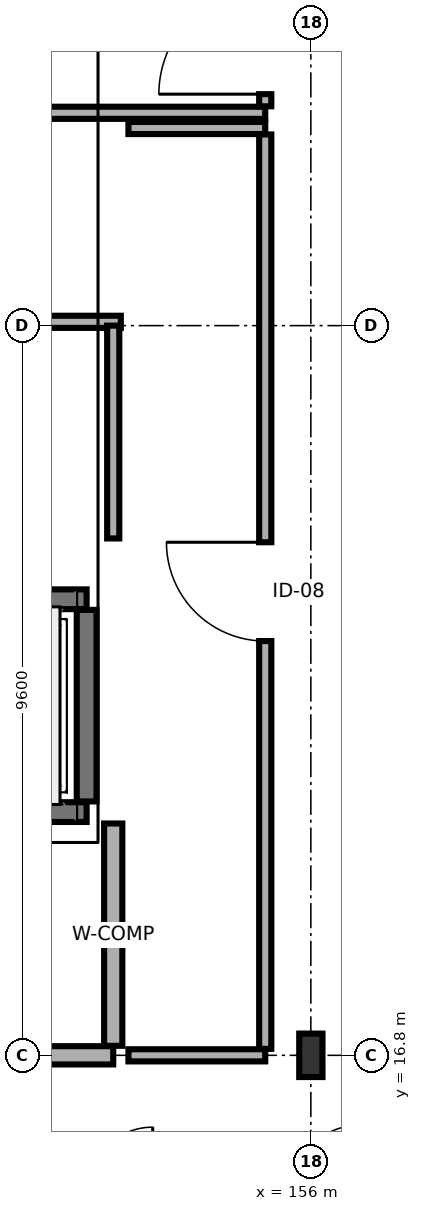
"""IFC4 building model, lengths in metres.
Left out: names, types, materials, properties, quantities, classifications, styles, units other than length and angle.
Written with IfcOpenShell. Run it as: python <this file> out.ifc"""

import sys

from ifc_helpers import new_model, si_unit, direction, frame, frame_2d, origin, origin_2d, place, context, subcontext, project, spatial, rectangle, i_section, extrude, element, fill, save


model = new_model("IFC4")
c1 = context("Model", 3, precision=1e-05, world=origin(), true_north=direction((0.0, 1.0)))
c2 = subcontext(c1, "Body", "Model", "MODEL_VIEW")
j1 = project(units=[si_unit("LENGTHUNIT", "METRE"), si_unit("PLANEANGLEUNIT", "RADIAN")], contexts=[c1])
p1 = place(None, origin())
s1 = spatial("IfcSite", under=j1, at=p1, CompositionType="ELEMENT")
p2 = place(p1, origin())
s2 = spatial("IfcBuilding", under=s1, at=p2, CompositionType="ELEMENT")
p3 = place(p2, frame((0.0, 0.0, 24.9)))
s3 = spatial("IfcBuildingStorey", under=s2, at=p3, CompositionType="ELEMENT", Elevation=24.9)
p4 = place(p3, frame((156.0, 16.8, 0.0), z_axis=(0.0, 0.0, 1.0), x_axis=(1.0, 0.0, 0.0)))
e1 = element("IfcColumn", 1, at=p4, inside=s3, PredefinedType="COLUMN", context=c2, shape_type="SweptSolid", body=[
    extrude(i_section(OverallWidth=0.306, OverallDepth=0.572, WebThickness=0.021, FlangeThickness=0.04, FilletRadius=0.027, at=origin_2d()), origin(), (0.0, 0.0, 1.0), 3.4),
])
p5 = place(p3, frame((150.55, 20.0, 0.0), z_axis=(0.0, 0.0, 1.0), x_axis=(1.0, 0.0, 0.0)))
e2 = element("IfcWall", 2, at=p5, inside=s3, PredefinedType="SHEAR", context=c2, shape_type="SweptSolid", body=[
    extrude(rectangle(XDim=2.5, YDim=0.26, at=frame_2d((1.25, 0.0))), origin(), (0.0, 0.0, 1.0), 3.19),
])
p6 = place(p5, frame((0.55, 0.0, 0.0)))
e3 = element("IfcOpeningElement", 3, at=p6, cuts=e2, PredefinedType="OPENING", context=c2, shape_type="SweptSolid", body=[
    extrude(rectangle(XDim=1.4, YDim=2.3, at=frame_2d((0.7, 1.15))), frame((0.0, 0.14, 0.0), z_axis=(0.0, -1.0, 0.0), x_axis=(1.0, 0.0, 0.0)), (0.0, 0.0, 1.0), 0.28),
])
p7 = place(p3, frame((150.55, 22.8, 0.0), z_axis=(0.0, 0.0, 1.0), x_axis=(1.0, 0.0, 0.0)))
e4 = element("IfcWall", 4, at=p7, inside=s3, PredefinedType="SHEAR", context=c2, shape_type="SweptSolid", body=[
    extrude(rectangle(XDim=2.5, YDim=0.26, at=frame_2d((1.25, 0.0))), origin(), (0.0, 0.0, 1.0), 3.19),
])
p8 = place(p3, frame((153.05, 20.14, 0.0), z_axis=(0.0, 0.0, 1.0), x_axis=(0.0, 1.0, 0.0)))
e5 = element("IfcWall", 5, at=p8, inside=s3, PredefinedType="SHEAR", context=c2, shape_type="SweptSolid", body=[
    extrude(rectangle(XDim=2.52, YDim=0.26, at=frame_2d((1.26, 0.0))), origin(), (0.0, 0.0, 1.0), 3.19),
])
p9 = place(p3, frame((146.4, 16.8, 0.0), z_axis=(0.0, 0.0, 1.0), x_axis=(1.0, 0.0, 0.0)))
e6 = element("IfcWall", 6, at=p9, inside=s3, PredefinedType="SOLIDWALL", context=c2, shape_type="SweptSolid", body=[
    extrude(rectangle(XDim=7.0, YDim=0.24, at=frame_2d((3.5, 0.0))), origin(), (0.0, 0.0, 1.0), 2.725),
])
p10 = place(p9, frame((2.7, 0.0, 0.0)))
e7 = element("IfcOpeningElement", 7, at=p10, cuts=e6, PredefinedType="OPENING", context=c2, shape_type="SweptSolid", body=[
    extrude(rectangle(XDim=1.6, YDim=2.2, at=frame_2d((0.8, 1.1))), frame((0.0, 0.13, 0.0), z_axis=(0.0, -1.0, 0.0), x_axis=(1.0, 0.0, 0.0)), (0.0, 0.0, 1.0), 0.26),
])
p11 = place(p3, frame((153.4, 16.925, 0.0), z_axis=(0.0, 0.0, 1.0), x_axis=(0.0, 1.0, 0.0)))
e8 = element("IfcWall", 8, at=p11, inside=s3, PredefinedType="SOLIDWALL", context=c2, shape_type="SweptSolid", body=[
    extrude(rectangle(XDim=2.925, YDim=0.24, at=frame_2d((1.462, 0.0))), origin(), (0.0, 0.0, 1.0), 2.725),
])
p12 = place(p3, frame((146.4, 29.2, 0.0), z_axis=(0.0, 0.0, 1.0), x_axis=(1.0, 0.0, 0.0)))
e9 = element("IfcWall", 9, at=p12, inside=s3, PredefinedType="PARTITIONING", context=c2, shape_type="SweptSolid", body=[
    extrude(rectangle(XDim=9.0, YDim=0.16, at=frame_2d((4.5, 0.0))), origin(), (0.0, 0.0, 1.0), 3.19),
])
p13 = place(p3, frame((155.4, 29.285, 0.0), z_axis=(0.0, 0.0, 1.0), x_axis=(0.0, 1.0, 0.0)))
e10 = element("IfcWall", 10, at=p13, inside=s3, PredefinedType="PARTITIONING", context=c2, shape_type="SweptSolid", body=[
    extrude(rectangle(XDim=9.03, YDim=0.16, at=frame_2d((4.515, 0.0))), origin(), (0.0, 0.0, 1.0), 3.19),
])
p14 = place(p13, frame((0.16, 0.0, 0.0)))
e11 = element("IfcOpeningElement", 11, at=p14, cuts=e10, PredefinedType="OPENING", context=c2, shape_type="SweptSolid", body=[
    extrude(rectangle(XDim=1.4, YDim=2.2, at=frame_2d((0.7, 1.1))), frame((0.0, 0.09, 0.0), z_axis=(0.0, -1.0, 0.0), x_axis=(1.0, 0.0, 0.0)), (0.0, 0.0, 1.0), 0.18),
])
p15 = place(p3, frame((153.6, 16.8, 0.0), z_axis=(0.0, 0.0, 1.0), x_axis=(1.0, 0.0, 0.0)))
e12 = element("IfcWall", 12, at=p15, inside=s3, PredefinedType="PARTITIONING", context=c2, shape_type="SweptSolid", body=[
    extrude(rectangle(XDim=1.8, YDim=0.16, at=frame_2d((0.9, 0.0))), origin(), (0.0, 0.0, 1.0), 2.725),
])
p16 = place(p3, frame((153.6, 29.0, 0.0), z_axis=(0.0, 0.0, 1.0), x_axis=(1.0, 0.0, 0.0)))
e13 = element("IfcWall", 13, at=p16, inside=s3, PredefinedType="PARTITIONING", context=c2, shape_type="SweptSolid", body=[
    extrude(rectangle(XDim=1.8, YDim=0.16, at=frame_2d((0.9, 0.0))), origin(), (0.0, 0.0, 1.0), 3.19),
])
p17 = place(p3, frame((155.4, 16.885, 0.0), z_axis=(0.0, 0.0, 1.0), x_axis=(0.0, 1.0, 0.0)))
e14 = element("IfcWall", 14, at=p17, inside=s3, PredefinedType="PARTITIONING", context=c2, shape_type="SweptSolid", body=[
    extrude(rectangle(XDim=12.03, YDim=0.16, at=frame_2d((6.015, 0.0))), origin(), (0.0, 0.0, 1.0), 2.725),
])
p18 = place(p17, frame((5.365, 0.0, 0.0)))
e15 = element("IfcOpeningElement", 15, at=p18, cuts=e14, PredefinedType="OPENING", context=c2, shape_type="SweptSolid", body=[
    extrude(rectangle(XDim=1.3, YDim=2.2, at=frame_2d((0.65, 1.1))), frame((0.0, 0.09, 0.0), z_axis=(0.0, -1.0, 0.0), x_axis=(1.0, 0.0, 0.0)), (0.0, 0.0, 1.0), 0.18),
])
p19 = place(p3, frame((152.35, 26.45, 0.0), z_axis=(0.0, 0.0, 1.0), x_axis=(1.0, 0.0, 0.0)))
e16 = element("IfcWall", 16, at=p19, inside=s3, PredefinedType="PARTITIONING", context=c2, shape_type="SweptSolid", body=[
    extrude(rectangle(XDim=1.15, YDim=0.16, at=frame_2d((0.575, 0.0))), origin(), (0.0, 0.0, 1.0), 3.19),
])
p20 = place(p3, frame((153.4, 23.6, 0.0), z_axis=(0.0, 0.0, 1.0), x_axis=(0.0, 1.0, 0.0)))
e17 = element("IfcWall", 17, at=p20, inside=s3, PredefinedType="PARTITIONING", context=c2, shape_type="SweptSolid", body=[
    extrude(rectangle(XDim=2.8, YDim=0.16, at=frame_2d((1.4, 0.0))), origin(), (0.0, 0.0, 1.0), 3.19),
])
p21 = place(p14, origin())
e18 = element("IfcDoor", 18, at=p21, inside=s3, OperationType="SINGLE_SWING_LEFT", PredefinedType="DOOR", context=c2, shape_type="SweptSolid", body=[
    extrude(rectangle(XDim=1.4, YDim=2.2, at=frame_2d((0.7, 1.1))), frame((0.0, 0.025, 0.0), z_axis=(0.0, -1.0, 0.0), x_axis=(1.0, 0.0, 0.0)), (0.0, 0.0, 1.0), 0.05),
])
fill(e11, e18)
p22 = place(p18, origin())
e19 = element("IfcDoor", 19, at=p22, inside=s3, OperationType="SINGLE_SWING_RIGHT", PredefinedType="DOOR", context=c2, shape_type="SweptSolid", body=[
    extrude(rectangle(XDim=1.3, YDim=2.2, at=frame_2d((0.65, 1.1))), frame((0.0, 0.025, 0.0), z_axis=(0.0, -1.0, 0.0), x_axis=(1.0, 0.0, 0.0)), (0.0, 0.0, 1.0), 0.05),
])
fill(e15, e19)
save(model, sys.argv[1])
